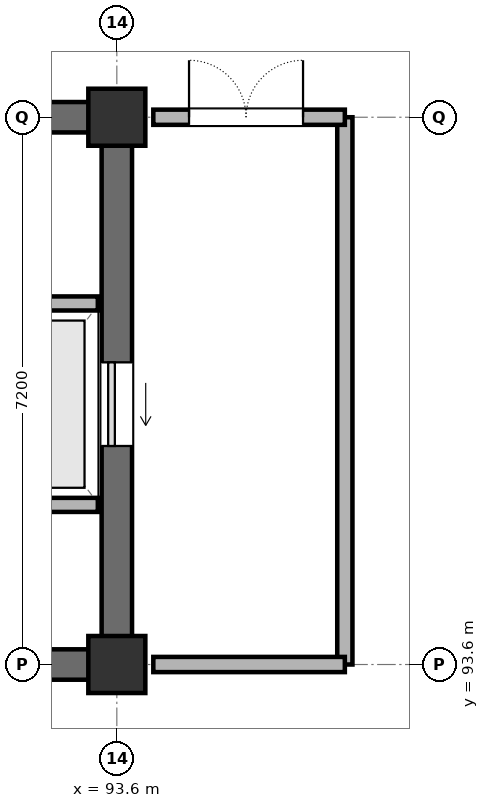
"""IFC4 building model, lengths in metres.
Left out: names, types, materials, properties, quantities, classifications, styles, units other than length and angle.
Written with IfcOpenShell. Run it as: python <this file> out.ifc"""

import sys

from ifc_helpers import new_model, si_unit, direction, frame, frame_2d, origin, origin_2d, place, context, subcontext, project, spatial, rectangle, extrude, element, fill, save


model = new_model("IFC4")
c1 = context("Model", 3, precision=1e-05, world=origin(), true_north=direction((0.0, 1.0)))
c2 = subcontext(c1, "Body", "Model", "MODEL_VIEW")
j1 = project(units=[si_unit("LENGTHUNIT", "METRE"), si_unit("PLANEANGLEUNIT", "RADIAN")], contexts=[c1])
p1 = place(None, origin())
s1 = spatial("IfcSite", under=j1, at=p1, CompositionType="ELEMENT")
p2 = place(p1, origin())
s2 = spatial("IfcBuilding", under=s1, at=p2, CompositionType="ELEMENT")
p3 = place(p2, frame((0.0, 0.0, 10.2)))
s3 = spatial("IfcBuildingStorey", under=s2, at=p3, CompositionType="ELEMENT", Elevation=10.2)
for number, where, z_axis, x_axis in (
    (1, (93.6, 93.6, 0.0), (0.0, 0.0, 1.0), (1.0, 0.0, 0.0)),
    (2, (93.6, 100.8, 0.0), (0.0, 0.0, 1.0), (1.0, 0.0, 0.0)),
):
    element("IfcColumn", number, at=place(p3, frame(where, z_axis=z_axis, x_axis=x_axis)), inside=s3, PredefinedType="COLUMN", context=c2, shape_type="SweptSolid", body=[
        extrude(rectangle(XDim=0.75, YDim=0.75, at=origin_2d()), origin(), (0.0, 0.0, 1.0), 4.2),
    ])
p4 = place(p3, frame((86.75, 93.6, 0.0), z_axis=(0.0, 0.0, 1.0), x_axis=(1.0, 0.0, 0.0)))
e3 = element("IfcWall", 3, at=p4, inside=s3, PredefinedType="SHEAR", context=c2, shape_type="SweptSolid", body=[
    extrude(rectangle(XDim=6.5, YDim=0.4, at=frame_2d((3.25, 0.0))), origin(), (0.0, 0.0, 1.0), 4.2),
])
p5 = place(p3, frame((93.6, 93.95, 0.0), z_axis=(0.0, 0.0, 1.0), x_axis=(0.0, 1.0, 0.0)))
e4 = element("IfcWall", 4, at=p5, inside=s3, PredefinedType="SHEAR", context=c2, shape_type="SweptSolid", body=[
    extrude(rectangle(XDim=6.5, YDim=0.4, at=frame_2d((3.25, 0.0))), origin(), (0.0, 0.0, 1.0), 4.2),
])
p6 = place(p5, frame((2.525, 0.0, 0.0)))
e5 = element("IfcOpeningElement", 5, at=p6, cuts=e4, PredefinedType="OPENING", context=c2, shape_type="SweptSolid", body=[
    extrude(rectangle(XDim=1.1, YDim=2.2, at=frame_2d((0.55, 1.1))), frame((0.0, 0.21, 0.0), z_axis=(0.0, -1.0, 0.0), x_axis=(1.0, 0.0, 0.0)), (0.0, 0.0, 1.0), 0.42),
])
p7 = place(p3, frame((93.25, 100.8, 0.0), z_axis=(0.0, 0.0, 1.0), x_axis=(-1.0, 0.0, 0.0)))
e6 = element("IfcWall", 6, at=p7, inside=s3, PredefinedType="SHEAR", context=c2, shape_type="SweptSolid", body=[
    extrude(rectangle(XDim=6.5, YDim=0.4, at=frame_2d((3.25, 0.0))), origin(), (0.0, 0.0, 1.0), 4.2),
])
p8 = place(p7, frame((3.6, 0.0, 0.0)))
e7 = element("IfcOpeningElement", 7, at=p8, cuts=e6, PredefinedType="OPENING", context=c2, shape_type="SweptSolid", body=[
    extrude(rectangle(XDim=1.2, YDim=2.2, at=frame_2d((0.6, 1.1))), frame((0.0, 0.21, 0.0), z_axis=(0.0, -1.0, 0.0), x_axis=(1.0, 0.0, 0.0)), (0.0, 0.0, 1.0), 0.42),
])
for number, where, z_axis, x_axis in (
    (8, (91.25, 95.7, 0.0), (0.0, 0.0, 1.0), (1.0, 0.0, 0.0)),
    (9, (91.25, 98.35, 0.0), (0.0, 0.0, 1.0), (1.0, 0.0, 0.0)),
):
    element("IfcWall", number, at=place(p3, frame(where, z_axis=z_axis, x_axis=x_axis)), inside=s3, PredefinedType="PARTITIONING", context=c2, shape_type="SweptSolid", body=[
        extrude(rectangle(XDim=2.1, YDim=0.185, at=frame_2d((1.05, 0.0))), origin(), (0.0, 0.0, 1.0), 4.2),
    ])
p9 = place(p3, frame((96.6, 93.6, 0.0), z_axis=(0.0, 0.0, 1.0), x_axis=(0.0, 1.0, 0.0)))
e10 = element("IfcWall", 10, at=p9, inside=s3, PredefinedType="PARTITIONING", context=c2, shape_type="SweptSolid", body=[
    extrude(rectangle(XDim=7.2, YDim=0.2, at=frame_2d((3.6, 0.0))), origin(), (0.0, 0.0, 1.0), 3.08),
])
p10 = place(p3, frame((94.08, 93.6, 0.0), z_axis=(0.0, 0.0, 1.0), x_axis=(1.0, 0.0, 0.0)))
e11 = element("IfcWall", 11, at=p10, inside=s3, PredefinedType="PARTITIONING", context=c2, shape_type="SweptSolid", body=[
    extrude(rectangle(XDim=2.52, YDim=0.2, at=frame_2d((1.26, 0.0))), origin(), (0.0, 0.0, 1.0), 3.08),
])
p11 = place(p3, frame((96.6, 100.8, 0.0), z_axis=(0.0, 0.0, 1.0), x_axis=(-1.0, 0.0, 0.0)))
e12 = element("IfcWall", 12, at=p11, inside=s3, PredefinedType="PARTITIONING", context=c2, shape_type="SweptSolid", body=[
    extrude(rectangle(XDim=2.52, YDim=0.2, at=frame_2d((1.26, 0.0))), origin(), (0.0, 0.0, 1.0), 3.08),
])
p12 = place(p11, frame((0.55, 0.0, 0.0)))
e13 = element("IfcOpeningElement", 13, at=p12, cuts=e12, PredefinedType="OPENING", context=c2, shape_type="SweptSolid", body=[
    extrude(rectangle(XDim=1.5, YDim=2.2, at=frame_2d((0.75, 1.1))), frame((0.0, 0.11, 0.0), z_axis=(0.0, -1.0, 0.0), x_axis=(1.0, 0.0, 0.0)), (0.0, 0.0, 1.0), 0.22),
])
p13 = place(p6, origin())
e14 = element("IfcDoor", 14, at=p13, inside=s3, OperationType="SLIDING_TO_LEFT", PredefinedType="DOOR", context=c2, shape_type="SweptSolid", body=[
    extrude(rectangle(XDim=1.1, YDim=2.2, at=frame_2d((0.55, 1.1))), frame((0.0, 0.025, 0.0), z_axis=(0.0, -1.0, 0.0), x_axis=(1.0, 0.0, 0.0)), (0.0, 0.0, 1.0), 0.05),
])
fill(e5, e14)
p14 = place(p12, frame((1.5, 0.0, 0.0), z_axis=(0.0, 0.0, 1.0), x_axis=(-1.0, 0.0, 0.0)))
e15 = element("IfcDoor", 15, at=p14, inside=s3, OperationType="DOUBLE_DOOR_SINGLE_SWING", PredefinedType="DOOR", context=c2, shape_type="SweptSolid", body=[
    extrude(rectangle(XDim=1.5, YDim=2.2, at=frame_2d((0.75, 1.1))), frame((0.0, 0.025, 0.0), z_axis=(0.0, -1.0, 0.0), x_axis=(1.0, 0.0, 0.0)), (0.0, 0.0, 1.0), 0.05),
])
fill(e13, e15)
save(model, sys.argv[1])
